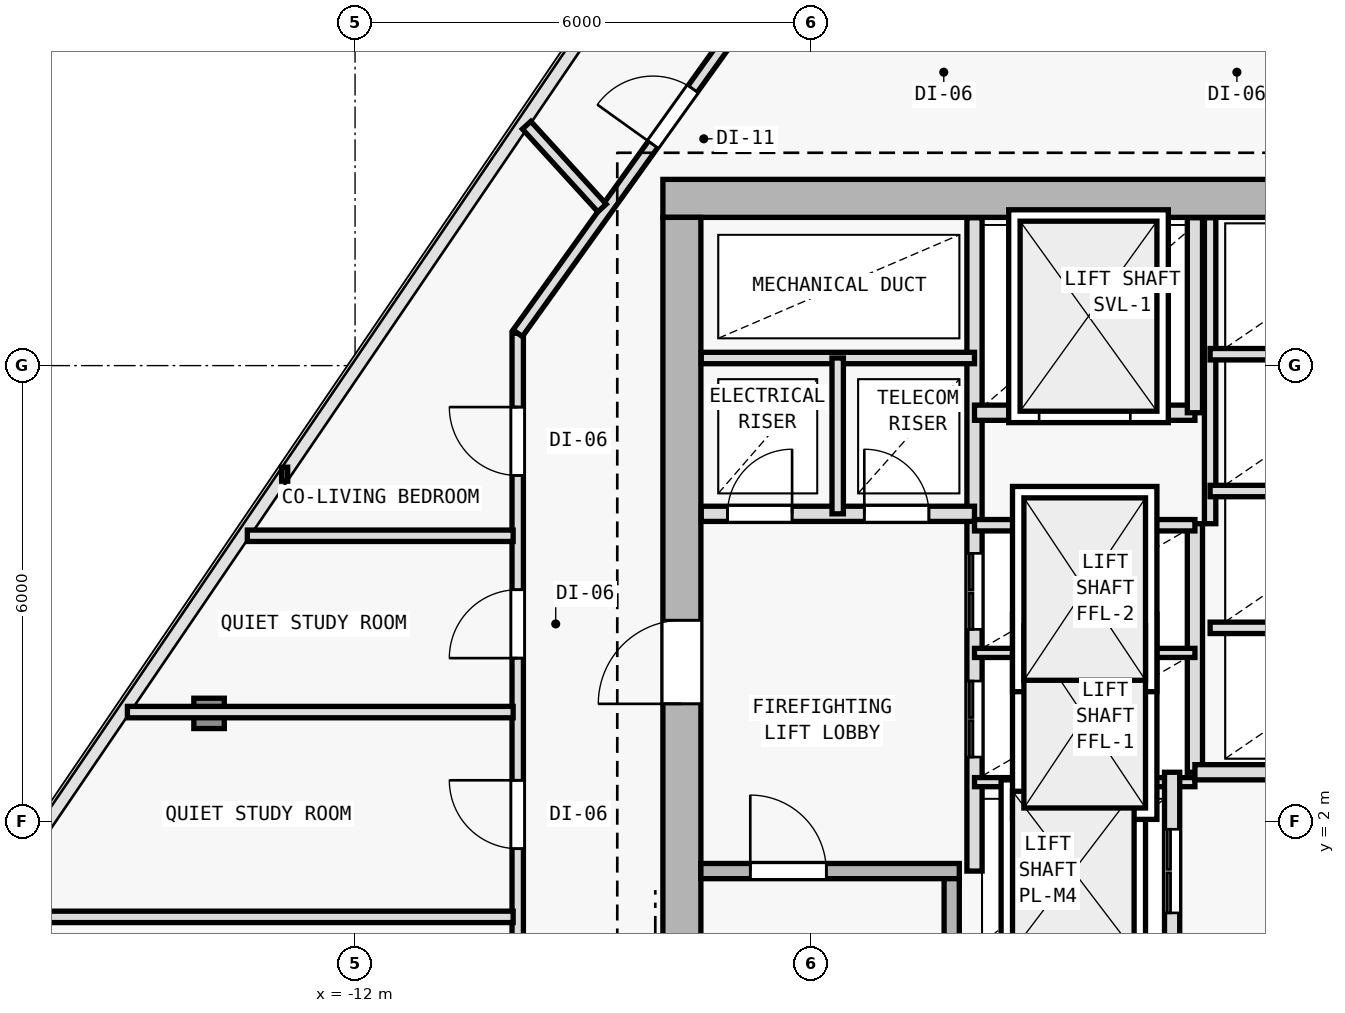
"""IFC4 building model, lengths in metres.
Left out: names, types, materials, properties, quantities, classifications, styles, units other than length and angle.
Written with IfcOpenShell. Run it as: python <this file> out.ifc"""

import sys

from ifc_helpers import new_model, si_unit, direction, frame, frame_2d, origin, origin_2d, place, context, subcontext, project, spatial, rectangle, i_section, extrude, element, fill, save


model = new_model("IFC4")
c1 = context("Model", 3, precision=1e-05, world=origin(), true_north=direction((0.0, 1.0)))
c2 = subcontext(c1, "Body", "Model", "MODEL_VIEW")
j1 = project(units=[si_unit("LENGTHUNIT", "METRE"), si_unit("PLANEANGLEUNIT", "RADIAN")], contexts=[c1])
p1 = place(None, origin())
s1 = spatial("IfcSite", under=j1, at=p1, CompositionType="ELEMENT")
p2 = place(p1, origin())
s2 = spatial("IfcBuilding", under=s1, at=p2, CompositionType="ELEMENT")
p3 = place(p2, frame((0.0, 0.0, 163.8)))
s3 = spatial("IfcBuildingStorey", under=s2, at=p3, CompositionType="ELEMENT", Elevation=163.8)
for number, where, z_axis, x_axis in (
    (1, (-7.7, 10.2, 0.0), (0.0, 0.0, 1.0), (1.0, 0.0, 0.0)),
    (2, (-7.7, 2.0, 0.0), (0.0, 0.0, 1.0), (1.0, 0.0, 0.0)),
):
    element("IfcColumn", number, at=place(p3, frame(where, z_axis=z_axis, x_axis=x_axis)), inside=s3, PredefinedType="COLUMN", context=c2, shape_type="SweptSolid", body=[
        extrude(i_section(OverallWidth=0.404, OverallDepth=0.407, WebThickness=0.017, FlangeThickness=0.028, FilletRadius=0.015, at=origin_2d()), origin(), (0.0, 0.0, 1.0), 3.6),
    ])
p4 = place(p3, frame((-13.921, 3.425, 0.005), z_axis=(0.017070406608, 0.009521342331, 0.99980895438), x_axis=(-0.487119351792, 0.873335409284, 0.0)))
e3 = element("IfcColumn", 3, at=p4, inside=s3, PredefinedType="COLUMN", context=c2, shape_type="SweptSolid", body=[
    extrude(i_section(OverallWidth=0.401, OverallDepth=0.399, WebThickness=0.016, FlangeThickness=0.025, FilletRadius=0.015, at=origin_2d()), origin(), (0.0, 0.0, 1.0), 3.59),
])
p5 = place(p3, frame((7.95, 10.2, 0.0), z_axis=(0.0, 0.0, 1.0), x_axis=(-1.0, 0.0, 0.0)))
e4 = element("IfcWall", 4, at=p5, inside=s3, PredefinedType="SHEAR", context=c2, shape_type="SweptSolid", body=[
    extrude(rectangle(XDim=15.9, YDim=0.5, at=frame_2d((7.95, 0.0))), origin(), (0.0, 0.0, 1.0), 3.35),
])
p6 = place(p5, frame((4.4, 0.0, 0.0)))
e5 = element("IfcOpeningElement", 5, at=p6, cuts=e4, PredefinedType="OPENING", context=c2, shape_type="SweptSolid", body=[
    extrude(rectangle(XDim=1.1, YDim=2.15, at=frame_2d((0.55, 1.075))), frame((0.0, 0.26, 0.0), z_axis=(0.0, -1.0, 0.0), x_axis=(1.0, 0.0, 0.0)), (0.0, 0.0, 1.0), 0.52),
])
p7 = place(p3, frame((-7.7, -9.15, 0.0), z_axis=(0.0, 0.0, 1.0), x_axis=(0.0, 1.0, 0.0)))
e6 = element("IfcWall", 6, at=p7, inside=s3, PredefinedType="SHEAR", context=c2, shape_type="SweptSolid", body=[
    extrude(rectangle(XDim=19.1, YDim=0.5, at=frame_2d((9.55, 0.0))), origin(), (0.0, 0.0, 1.0), 3.35),
])
p8 = place(p7, frame((12.7, 0.0, 0.0)))
e7 = element("IfcOpeningElement", 7, at=p8, cuts=e6, PredefinedType="OPENING", context=c2, shape_type="SweptSolid", body=[
    extrude(rectangle(XDim=1.1, YDim=2.15, at=frame_2d((0.55, 1.075))), frame((0.0, 0.26, 0.0), z_axis=(0.0, -1.0, 0.0), x_axis=(1.0, 0.0, 0.0)), (0.0, 0.0, 1.0), 0.52),
])
p9 = place(p3, frame((-7.45, 1.35, 0.0), z_axis=(0.0, 0.0, 1.0), x_axis=(1.0, 0.0, 0.0)))
e8 = element("IfcWall", 8, at=p9, inside=s3, PredefinedType="SOLIDWALL", context=c2, shape_type="SweptSolid", body=[
    extrude(rectangle(XDim=3.4, YDim=0.2, at=frame_2d((1.7, 0.0))), origin(), (0.0, 0.0, 1.0), 3.35),
])
p10 = place(p9, frame((0.65, 0.0, 0.0)))
e9 = element("IfcOpeningElement", 9, at=p10, cuts=e8, PredefinedType="OPENING", context=c2, shape_type="SweptSolid", body=[
    extrude(rectangle(XDim=1.0, YDim=2.15, at=frame_2d((0.5, 1.075))), frame((0.0, 0.11, 0.0), z_axis=(0.0, -1.0, 0.0), x_axis=(1.0, 0.0, 0.0)), (0.0, 0.0, 1.0), 0.22),
])
p11 = place(p3, frame((-4.15, -5.95, 0.0), z_axis=(0.0, 0.0, 1.0), x_axis=(0.0, 1.0, 0.0)))
e10 = element("IfcWall", 10, at=p11, inside=s3, PredefinedType="SOLIDWALL", context=c2, shape_type="SweptSolid", body=[
    extrude(rectangle(XDim=7.2, YDim=0.2, at=frame_2d((3.6, 0.0))), origin(), (0.0, 0.0, 1.0), 3.35),
])
p12 = place(p3, frame((-3.85, 1.35, 0.0), z_axis=(0.0, 0.0, 1.0), x_axis=(0.0, 1.0, 0.0)))
e11 = element("IfcWall", 11, at=p12, inside=s3, PredefinedType="SOLIDWALL", context=c2, shape_type="SweptSolid", body=[
    extrude(rectangle(XDim=8.595, YDim=0.2, at=frame_2d((4.297, 0.0))), origin(), (0.0, 0.0, 1.0), 3.35),
])
p13 = place(p12, frame((1.5, 0.0, 0.0)))
e12 = element("IfcOpeningElement", 12, at=p13, cuts=e11, PredefinedType="OPENING", context=c2, shape_type="SweptSolid", body=[
    extrude(rectangle(XDim=1.0, YDim=2.15, at=frame_2d((0.5, 1.075))), frame((0.0, 0.11, 0.0), z_axis=(0.0, -1.0, 0.0), x_axis=(1.0, 0.0, 0.0)), (0.0, 0.0, 1.0), 0.22),
])
p14 = place(p12, frame((3.18, 0.0, 0.0)))
e13 = element("IfcOpeningElement", 13, at=p14, cuts=e11, PredefinedType="OPENING", context=c2, shape_type="SweptSolid", body=[
    extrude(rectangle(XDim=1.0, YDim=2.15, at=frame_2d((0.5, 1.075))), frame((0.0, 0.11, 0.0), z_axis=(0.0, -1.0, 0.0), x_axis=(1.0, 0.0, 0.0)), (0.0, 0.0, 1.0), 0.22),
])
p15 = place(p3, frame((-7.445, 6.05, 0.0), z_axis=(0.0, 0.0, 1.0), x_axis=(1.0, 0.0, 0.0)))
e14 = element("IfcWall", 14, at=p15, inside=s3, PredefinedType="SOLIDWALL", context=c2, shape_type="SweptSolid", body=[
    extrude(rectangle(XDim=3.595, YDim=0.2, at=frame_2d((1.797, 0.0))), origin(), (0.0, 0.0, 1.0), 3.35),
])
p16 = place(p15, frame((0.345, 0.0, 0.0)))
e15 = element("IfcOpeningElement", 15, at=p16, cuts=e14, PredefinedType="OPENING", context=c2, shape_type="SweptSolid", body=[
    extrude(rectangle(XDim=0.85, YDim=2.1, at=frame_2d((0.425, 1.05))), frame((0.0, 0.11, 0.0), z_axis=(0.0, -1.0, 0.0), x_axis=(1.0, 0.0, 0.0)), (0.0, 0.0, 1.0), 0.22),
])
p17 = place(p15, frame((2.145, 0.0, 0.0)))
e16 = element("IfcOpeningElement", 16, at=p17, cuts=e14, PredefinedType="OPENING", context=c2, shape_type="SweptSolid", body=[
    extrude(rectangle(XDim=0.85, YDim=2.1, at=frame_2d((0.425, 1.05))), frame((0.0, 0.11, 0.0), z_axis=(0.0, -1.0, 0.0), x_axis=(1.0, 0.0, 0.0)), (0.0, 0.0, 1.0), 0.22),
])
p18 = place(p3, frame((-7.445, 8.1, 0.0), z_axis=(0.0, 0.0, 1.0), x_axis=(1.0, 0.0, 0.0)))
e17 = element("IfcWall", 17, at=p18, inside=s3, PredefinedType="PARTITIONING", context=c2, shape_type="SweptSolid", body=[
    extrude(rectangle(XDim=3.595, YDim=0.15, at=frame_2d((1.797, 0.0))), origin(), (0.0, 0.0, 1.0), 3.35),
])
p19 = place(p3, frame((-5.65, 6.05, 0.0), z_axis=(0.0, 0.0, 1.0), x_axis=(0.0, 1.0, 0.0)))
e18 = element("IfcWall", 18, at=p19, inside=s3, PredefinedType="PARTITIONING", context=c2, shape_type="SweptSolid", body=[
    extrude(rectangle(XDim=2.05, YDim=0.15, at=frame_2d((1.025, 0.0))), origin(), (0.0, 0.0, 1.0), 3.35),
])
p20 = place(p3, frame((-0.95, 2.65, 0.0), z_axis=(0.0, 0.0, 1.0), x_axis=(0.0, 1.0, 0.0)))
e19 = element("IfcWall", 19, at=p20, inside=s3, PredefinedType="SOLIDWALL", context=c2, shape_type="SweptSolid", body=[
    extrude(rectangle(XDim=3.27, YDim=0.2, at=frame_2d((1.635, 0.0))), origin(), (0.0, 0.0, 1.0), 3.35),
])
for number, where, z_axis, x_axis in (
    (20, (-3.85, 2.52, 0.0), (0.0, 0.0, 1.0), (1.0, 0.0, 0.0)),
    (21, (-3.85, 4.22, 0.0), (0.0, 0.0, 1.0), (1.0, 0.0, 0.0)),
):
    element("IfcWall", number, at=place(p3, frame(where, z_axis=z_axis, x_axis=x_axis)), inside=s3, PredefinedType="PARTITIONING", context=c2, shape_type="SweptSolid", body=[
        extrude(rectangle(XDim=2.9, YDim=0.12, at=frame_2d((1.45, 0.0))), origin(), (0.0, 0.0, 1.0), 3.35),
    ])
p21 = place(p3, frame((-3.85, 5.9, 0.0), z_axis=(0.0, 0.0, 1.0), x_axis=(1.0, 0.0, 0.0)))
e22 = element("IfcWall", 22, at=p21, inside=s3, PredefinedType="PARTITIONING", context=c2, shape_type="SweptSolid", body=[
    extrude(rectangle(XDim=2.9, YDim=0.15, at=frame_2d((1.45, 0.0))), origin(), (0.0, 0.0, 1.0), 3.35),
])
p22 = place(p3, frame((-3.85, 7.38, 0.0), z_axis=(0.0, 0.0, 1.0), x_axis=(1.0, 0.0, 0.0)))
e23 = element("IfcWall", 23, at=p22, inside=s3, PredefinedType="SOLIDWALL", context=c2, shape_type="SweptSolid", body=[
    extrude(rectangle(XDim=2.9, YDim=0.2, at=frame_2d((1.45, 0.0))), origin(), (0.0, 0.0, 1.0), 3.35),
])
p23 = place(p22, frame((0.85, 0.0, 0.0)))
e24 = element("IfcOpeningElement", 24, at=p23, cuts=e23, PredefinedType="OPENING", context=c2, shape_type="SweptSolid", body=[
    extrude(rectangle(XDim=1.2, YDim=2.2, at=frame_2d((0.6, 1.1))), frame((0.0, 0.11, 0.0), z_axis=(0.0, -1.0, 0.0), x_axis=(1.0, 0.0, 0.0)), (0.0, 0.0, 1.0), 0.22),
])
p24 = place(p3, frame((-0.95, 7.38, 0.0), z_axis=(0.0, 0.0, 1.0), x_axis=(0.0, 1.0, 0.0)))
e25 = element("IfcWall", 25, at=p24, inside=s3, PredefinedType="SOLIDWALL", context=c2, shape_type="SweptSolid", body=[
    extrude(rectangle(XDim=2.565, YDim=0.2, at=frame_2d((1.283, 0.0))), origin(), (0.0, 0.0, 1.0), 3.35),
])
p25 = place(p3, frame((-1.25, -6.05, 0.0), z_axis=(0.0, 0.0, 1.0), x_axis=(0.0, 1.0, 0.0)))
e26 = element("IfcWall", 26, at=p25, inside=s3, PredefinedType="SOLIDWALL", context=c2, shape_type="SweptSolid", body=[
    extrude(rectangle(XDim=8.7, YDim=0.2, at=frame_2d((4.35, 0.0))), origin(), (0.0, 0.0, 1.0), 3.35),
])
p26 = place(p25, frame((0.55, 0.0, 0.0)))
e27 = element("IfcOpeningElement", 27, at=p26, cuts=e26, PredefinedType="OPENING", context=c2, shape_type="SweptSolid", body=[
    extrude(rectangle(XDim=1.1, YDim=2.15, at=frame_2d((0.55, 1.075))), frame((0.0, 0.11, 0.0), z_axis=(0.0, -1.0, 0.0), x_axis=(1.0, 0.0, 0.0)), (0.0, 0.0, 1.0), 0.22),
])
p27 = place(p25, frame((2.65, 0.0, 0.0)))
e28 = element("IfcOpeningElement", 28, at=p27, cuts=e26, PredefinedType="OPENING", context=c2, shape_type="SweptSolid", body=[
    extrude(rectangle(XDim=1.1, YDim=2.15, at=frame_2d((0.55, 1.075))), frame((0.0, 0.11, 0.0), z_axis=(0.0, -1.0, 0.0), x_axis=(1.0, 0.0, 0.0)), (0.0, 0.0, 1.0), 0.22),
])
p28 = place(p25, frame((4.75, 0.0, 0.0)))
e29 = element("IfcOpeningElement", 29, at=p28, cuts=e26, PredefinedType="OPENING", context=c2, shape_type="SweptSolid", body=[
    extrude(rectangle(XDim=1.1, YDim=2.15, at=frame_2d((0.55, 1.075))), frame((0.0, 0.11, 0.0), z_axis=(0.0, -1.0, 0.0), x_axis=(1.0, 0.0, 0.0)), (0.0, 0.0, 1.0), 0.22),
])
p29 = place(p25, frame((6.85, 0.0, 0.0)))
e30 = element("IfcOpeningElement", 30, at=p29, cuts=e26, PredefinedType="OPENING", context=c2, shape_type="SweptSolid", body=[
    extrude(rectangle(XDim=1.1, YDim=2.15, at=frame_2d((0.55, 1.075))), frame((0.0, 0.11, 0.0), z_axis=(0.0, -1.0, 0.0), x_axis=(1.0, 0.0, 0.0)), (0.0, 0.0, 1.0), 0.22),
])
p30 = place(p3, frame((-0.95, 2.65, 0.0), z_axis=(0.0, 0.0, 1.0), x_axis=(1.0, 0.0, 0.0)))
e31 = element("IfcWall", 31, at=p30, inside=s3, PredefinedType="SOLIDWALL", context=c2, shape_type="SweptSolid", body=[
    extrude(rectangle(XDim=2.9, YDim=0.2, at=frame_2d((1.45, 0.0))), origin(), (0.0, 0.0, 1.0), 3.35),
])
p31 = place(p3, frame((-0.75, 5.92, 0.0), z_axis=(0.0, 0.0, 1.0), x_axis=(0.0, 1.0, 0.0)))
e32 = element("IfcWall", 32, at=p31, inside=s3, PredefinedType="PARTITIONING", context=c2, shape_type="SweptSolid", body=[
    extrude(rectangle(XDim=4.025, YDim=0.15, at=frame_2d((2.013, 0.0))), origin(), (0.0, 0.0, 1.0), 3.35),
])
for number, where, z_axis, x_axis in (
    (33, (-0.75, 4.55, 0.0), (0.0, 0.0, 1.0), (1.0, 0.0, 0.0)),
    (34, (-0.75, 6.35, 0.0), (0.0, 0.0, 1.0), (1.0, 0.0, 0.0)),
    (35, (-0.75, 8.15, 0.0), (0.0, 0.0, 1.0), (1.0, 0.0, 0.0)),
):
    element("IfcWall", number, at=place(p3, frame(where, z_axis=z_axis, x_axis=x_axis)), inside=s3, PredefinedType="PARTITIONING", context=c2, shape_type="SweptSolid", body=[
        extrude(rectangle(XDim=2.7, YDim=0.15, at=frame_2d((1.35, 0.0))), origin(), (0.0, 0.0, 1.0), 3.35),
    ])
p32 = place(p3, frame((-9.86, -11.56, 0.0), z_axis=(0.0, 0.0, 1.0), x_axis=(0.0, 1.0, 0.0)))
e36 = element("IfcWall", 36, at=p32, inside=s3, PredefinedType="PARTITIONING", context=c2, shape_type="SweptSolid", body=[
    extrude(rectangle(XDim=19.986, YDim=0.15, at=frame_2d((9.993, 0.0))), origin(), (0.0, 0.0, 1.0), 2.725),
])
p33 = place(p32, frame((10.717, 0.0, 0.0)))
e37 = element("IfcOpeningElement", 37, at=p33, cuts=e36, PredefinedType="OPENING", context=c2, shape_type="SweptSolid", body=[
    extrude(rectangle(XDim=0.9, YDim=2.1, at=frame_2d((0.45, 1.05))), frame((0.0, 0.085, 0.0), z_axis=(0.0, -1.0, 0.0), x_axis=(1.0, 0.0, 0.0)), (0.0, 0.0, 1.0), 0.17),
])
p34 = place(p32, frame((8.333, 0.0, 0.0)))
e38 = element("IfcOpeningElement", 38, at=p34, cuts=e36, PredefinedType="OPENING", context=c2, shape_type="SweptSolid", body=[
    extrude(rectangle(XDim=0.9, YDim=2.1, at=frame_2d((0.45, 1.05))), frame((0.0, 0.085, 0.0), z_axis=(0.0, -1.0, 0.0), x_axis=(1.0, 0.0, 0.0)), (0.0, 0.0, 1.0), 0.17),
])
p35 = place(p32, frame((5.612, 0.0, 0.0)))
e39 = element("IfcOpeningElement", 39, at=p35, cuts=e36, PredefinedType="OPENING", context=c2, shape_type="SweptSolid", body=[
    extrude(rectangle(XDim=0.9, YDim=2.1, at=frame_2d((0.45, 1.05))), frame((0.0, 0.085, 0.0), z_axis=(0.0, -1.0, 0.0), x_axis=(1.0, 0.0, 0.0)), (0.0, 0.0, 1.0), 0.17),
])
p36 = place(p32, frame((1.932, 0.0, 0.0)))
e40 = element("IfcOpeningElement", 40, at=p36, cuts=e36, PredefinedType="OPENING", context=c2, shape_type="SweptSolid", body=[
    extrude(rectangle(XDim=0.9, YDim=2.1, at=frame_2d((0.45, 1.05))), frame((0.0, 0.085, 0.0), z_axis=(0.0, -1.0, 0.0), x_axis=(1.0, 0.0, 0.0)), (0.0, 0.0, 1.0), 0.17),
])
p37 = place(p32, frame((18.115, 0.0, 0.0)))
e41 = element("IfcOpeningElement", 41, at=p37, cuts=e36, PredefinedType="OPENING", context=c2, shape_type="SweptSolid", body=[
    extrude(rectangle(XDim=0.9, YDim=2.1, at=frame_2d((0.45, 1.05))), frame((0.0, 0.085, 0.0), z_axis=(0.0, -1.0, 0.0), x_axis=(1.0, 0.0, 0.0)), (0.0, 0.0, 1.0), 0.17),
])
p38 = place(p32, frame((15.711, 0.0, 0.0)))
e42 = element("IfcOpeningElement", 42, at=p38, cuts=e36, PredefinedType="OPENING", context=c2, shape_type="SweptSolid", body=[
    extrude(rectangle(XDim=0.9, YDim=2.1, at=frame_2d((0.45, 1.05))), frame((0.0, 0.085, 0.0), z_axis=(0.0, -1.0, 0.0), x_axis=(1.0, 0.0, 0.0)), (0.0, 0.0, 1.0), 0.17),
])
p39 = place(p32, frame((13.205, 0.0, 0.0)))
e43 = element("IfcOpeningElement", 43, at=p39, cuts=e36, PredefinedType="OPENING", context=c2, shape_type="SweptSolid", body=[
    extrude(rectangle(XDim=0.9, YDim=2.1, at=frame_2d((0.45, 1.05))), frame((0.0, 0.085, 0.0), z_axis=(0.0, -1.0, 0.0), x_axis=(1.0, 0.0, 0.0)), (0.0, 0.0, 1.0), 0.17),
])
p40 = place(p3, frame((-9.86, 8.426, 0.0), z_axis=(0.0, 0.0, 1.0), x_axis=(0.582449511476, 0.812866881218, 0.0)))
e44 = element("IfcWall", 44, at=p40, inside=s3, PredefinedType="PARTITIONING", context=c2, shape_type="SweptSolid", body=[
    extrude(rectangle(XDim=4.84, YDim=0.15, at=frame_2d((2.42, 0.0))), origin(), (0.0, 0.0, 1.0), 2.965),
])
p41 = place(p40, frame((3.055, 0.0, 0.0)))
e45 = element("IfcOpeningElement", 45, at=p41, cuts=e44, PredefinedType="OPENING", context=c2, shape_type="SweptSolid", body=[
    extrude(rectangle(XDim=0.9, YDim=2.1, at=frame_2d((0.45, 1.05))), frame((0.0, 0.085, 0.0), z_axis=(0.0, -1.0, 0.0), x_axis=(1.0, 0.0, 0.0)), (0.0, 0.0, 1.0), 0.17),
])
p42 = place(p3, frame((-9.92, 3.442, 0.0), z_axis=(0.0, 0.0, 1.0), x_axis=(-1.0, 0.0, 0.0)))
e46 = element("IfcWall", 46, at=p42, inside=s3, PredefinedType="PARTITIONING", context=c2, shape_type="SweptSolid", body=[
    extrude(rectangle(XDim=5.075, YDim=0.15, at=frame_2d((2.538, 0.0))), origin(), (0.0, 0.0, 1.0), 2.935),
])
p43 = place(p3, frame((-8.75, 10.074, 0.0), z_axis=(0.0, 0.0, 1.0), x_axis=(-0.673703282985, 0.739001952971, 0.0)))
e47 = element("IfcWall", 47, at=p43, inside=s3, PredefinedType="PARTITIONING", context=c2, shape_type="SweptSolid", body=[
    extrude(rectangle(XDim=1.473, YDim=0.15, at=frame_2d((0.737, 0.0))), origin(), (0.0, 0.0, 1.0), 2.935),
])
p44 = place(p3, frame((-9.92, 5.761, 0.0), z_axis=(0.0, 0.0, 1.0), x_axis=(-1.0, 0.0, 0.0)))
e48 = element("IfcWall", 48, at=p44, inside=s3, PredefinedType="PARTITIONING", context=c2, shape_type="SweptSolid", body=[
    extrude(rectangle(XDim=3.497, YDim=0.15, at=frame_2d((1.749, 0.0))), origin(), (0.0, 0.0, 1.0), 2.935),
])
p45 = place(p3, frame((-9.92, 0.747, 0.0), z_axis=(0.0, 0.0, 1.0), x_axis=(-1.0, 0.0, 0.0)))
e49 = element("IfcWall", 49, at=p45, inside=s3, PredefinedType="PARTITIONING", context=c2, shape_type="SweptSolid", body=[
    extrude(rectangle(XDim=6.908, YDim=0.15, at=frame_2d((3.454, 0.0))), origin(), (0.0, 0.0, 1.0), 2.725),
])
p46 = place(p8, origin())
e50 = element("IfcDoor", 50, at=p46, inside=s3, OperationType="SINGLE_SWING_LEFT", PredefinedType="DOOR", context=c2, shape_type="SweptSolid", body=[
    extrude(rectangle(XDim=1.1, YDim=2.15, at=frame_2d((0.55, 1.075))), frame((0.0, 0.025, 0.0), z_axis=(0.0, -1.0, 0.0), x_axis=(1.0, 0.0, 0.0)), (0.0, 0.0, 1.0), 0.05),
])
fill(e7, e50)
p47 = place(p10, origin())
e51 = element("IfcDoor", 51, at=p47, inside=s3, OperationType="SINGLE_SWING_LEFT", PredefinedType="DOOR", context=c2, shape_type="SweptSolid", body=[
    extrude(rectangle(XDim=1.0, YDim=2.15, at=frame_2d((0.5, 1.075))), frame((0.0, 0.025, 0.0), z_axis=(0.0, -1.0, 0.0), x_axis=(1.0, 0.0, 0.0)), (0.0, 0.0, 1.0), 0.05),
])
fill(e9, e51)
p48 = place(p16, origin())
e52 = element("IfcDoor", 52, at=p48, inside=s3, OperationType="SINGLE_SWING_RIGHT", PredefinedType="DOOR", context=c2, shape_type="SweptSolid", body=[
    extrude(rectangle(XDim=0.85, YDim=2.1, at=frame_2d((0.425, 1.05))), frame((0.0, 0.025, 0.0), z_axis=(0.0, -1.0, 0.0), x_axis=(1.0, 0.0, 0.0)), (0.0, 0.0, 1.0), 0.05),
])
fill(e15, e52)
p49 = place(p17, origin())
e53 = element("IfcDoor", 53, at=p49, inside=s3, OperationType="SINGLE_SWING_LEFT", PredefinedType="DOOR", context=c2, shape_type="SweptSolid", body=[
    extrude(rectangle(XDim=0.85, YDim=2.1, at=frame_2d((0.425, 1.05))), frame((0.0, 0.025, 0.0), z_axis=(0.0, -1.0, 0.0), x_axis=(1.0, 0.0, 0.0)), (0.0, 0.0, 1.0), 0.05),
])
fill(e16, e53)
p50 = place(p23, origin())
e54 = element("IfcDoor", 54, at=p50, inside=s3, OperationType="DOUBLE_DOOR_SLIDING", PredefinedType="DOOR", context=c2, shape_type="SweptSolid", body=[
    extrude(rectangle(XDim=1.2, YDim=2.2, at=frame_2d((0.6, 1.1))), frame((0.0, 0.025, 0.0), z_axis=(0.0, -1.0, 0.0), x_axis=(1.0, 0.0, 0.0)), (0.0, 0.0, 1.0), 0.05),
])
fill(e24, e54)
p51 = place(p29, origin())
e55 = element("IfcDoor", 55, at=p51, inside=s3, OperationType="DOUBLE_DOOR_SLIDING", PredefinedType="DOOR", context=c2, shape_type="SweptSolid", body=[
    extrude(rectangle(XDim=1.1, YDim=2.15, at=frame_2d((0.55, 1.075))), frame((0.0, 0.025, 0.0), z_axis=(0.0, -1.0, 0.0), x_axis=(1.0, 0.0, 0.0)), (0.0, 0.0, 1.0), 0.05),
])
fill(e30, e55)
p52 = place(p13, origin())
e56 = element("IfcDoor", 56, at=p52, inside=s3, OperationType="DOUBLE_DOOR_SLIDING", PredefinedType="DOOR", context=c2, shape_type="SweptSolid", body=[
    extrude(rectangle(XDim=1.0, YDim=2.15, at=frame_2d((0.5, 1.075))), frame((0.0, 0.025, 0.0), z_axis=(0.0, -1.0, 0.0), x_axis=(1.0, 0.0, 0.0)), (0.0, 0.0, 1.0), 0.05),
])
fill(e12, e56)
p53 = place(p14, origin())
e57 = element("IfcDoor", 57, at=p53, inside=s3, OperationType="DOUBLE_DOOR_SLIDING", PredefinedType="DOOR", context=c2, shape_type="SweptSolid", body=[
    extrude(rectangle(XDim=1.0, YDim=2.15, at=frame_2d((0.5, 1.075))), frame((0.0, 0.025, 0.0), z_axis=(0.0, -1.0, 0.0), x_axis=(1.0, 0.0, 0.0)), (0.0, 0.0, 1.0), 0.05),
])
fill(e13, e57)
p54 = place(p41, origin())
e58 = element("IfcDoor", 58, at=p54, inside=s3, OperationType="SINGLE_SWING_LEFT", PredefinedType="DOOR", context=c2, shape_type="SweptSolid", body=[
    extrude(rectangle(XDim=0.9, YDim=2.1, at=frame_2d((0.45, 1.05))), frame((0.0, 0.025, 0.0), z_axis=(0.0, -1.0, 0.0), x_axis=(1.0, 0.0, 0.0)), (0.0, 0.0, 1.0), 0.05),
])
fill(e45, e58)
p55 = place(p37, origin())
e59 = element("IfcDoor", 59, at=p55, inside=s3, OperationType="SINGLE_SWING_RIGHT", PredefinedType="DOOR", context=c2, shape_type="SweptSolid", body=[
    extrude(rectangle(XDim=0.9, YDim=2.1, at=frame_2d((0.45, 1.05))), frame((0.0, 0.025, 0.0), z_axis=(0.0, -1.0, 0.0), x_axis=(1.0, 0.0, 0.0)), (0.0, 0.0, 1.0), 0.05),
])
fill(e41, e59)
p56 = place(p38, origin())
e60 = element("IfcDoor", 60, at=p56, inside=s3, OperationType="SINGLE_SWING_LEFT", PredefinedType="DOOR", context=c2, shape_type="SweptSolid", body=[
    extrude(rectangle(XDim=0.9, YDim=2.1, at=frame_2d((0.45, 1.05))), frame((0.0, 0.025, 0.0), z_axis=(0.0, -1.0, 0.0), x_axis=(1.0, 0.0, 0.0)), (0.0, 0.0, 1.0), 0.05),
])
fill(e42, e60)
p57 = place(p39, origin())
e61 = element("IfcDoor", 61, at=p57, inside=s3, OperationType="SINGLE_SWING_RIGHT", PredefinedType="DOOR", context=c2, shape_type="SweptSolid", body=[
    extrude(rectangle(XDim=0.9, YDim=2.1, at=frame_2d((0.45, 1.05))), frame((0.0, 0.025, 0.0), z_axis=(0.0, -1.0, 0.0), x_axis=(1.0, 0.0, 0.0)), (0.0, 0.0, 1.0), 0.05),
])
fill(e43, e61)
save(model, sys.argv[1])
